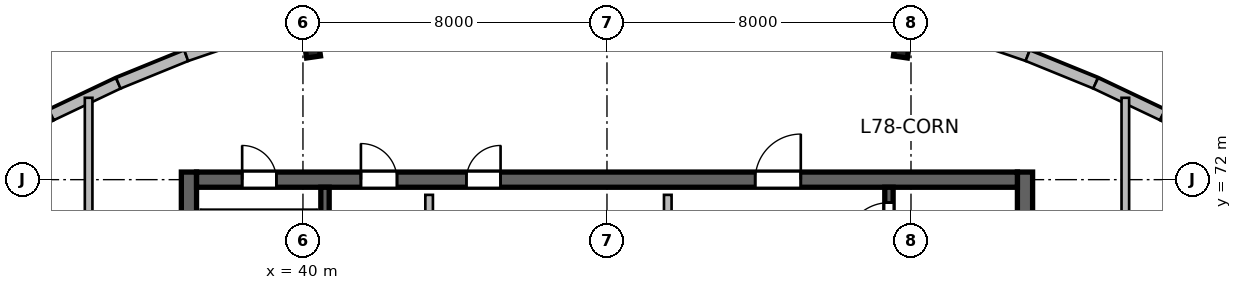
"""IFC4 building model, lengths in metres.
Left out: names, types, materials, properties, quantities, classifications, styles, units other than length and angle.
Written with IfcOpenShell. Run it as: python <this file> out.ifc"""

import sys

from ifc_helpers import new_model, si_unit, direction, frame, frame_2d, origin, origin_2d, place, context, subcontext, project, spatial, rectangle, i_section, extrude, source, transform, mapped, element, fill, save


model = new_model("IFC4")
c1 = context("Model", 3, precision=1e-05, world=origin(), true_north=direction((0.0, 1.0)))
c2 = subcontext(c1, "Body", "Model", "MODEL_VIEW")
j1 = project(units=[si_unit("LENGTHUNIT", "METRE"), si_unit("PLANEANGLEUNIT", "RADIAN")], contexts=[c1])
p1 = place(None, origin())
s1 = spatial("IfcSite", under=j1, at=p1, CompositionType="ELEMENT")
p2 = place(p1, origin())
s2 = spatial("IfcBuilding", under=s1, at=p2, CompositionType="ELEMENT")
p3 = place(p2, frame((0.0, 0.0, 323.4)))
s3 = spatial("IfcBuildingStorey", under=s2, at=p3, CompositionType="ELEMENT", Elevation=323.4)
m1 = source(origin(), c2, "Body", "SweptSolid", [
    extrude(rectangle(XDim=12.0, YDim=0.4, at=frame_2d((6.0, 0.0))), origin(), (0.0, 0.0, 1.0), 4.8),
])
for number, where, z_axis, x_axis in (
    (1, (37.0, 60.2, 0.0), (0.0, 0.0, 1.0), (0.0, 1.0, 0.0)),
    (2, (59.0, 60.2, 0.0), (0.0, 0.0, 1.0), (0.0, 1.0, 0.0)),
):
    element("IfcWall", number, at=place(p3, frame(where, z_axis=z_axis, x_axis=x_axis)), inside=s3, PredefinedType="SHEAR", context=c2, shape_type="MappedRepresentation", body=[
        mapped(m1, transform((0.0, 0.0, 0.0), scale=1.0)),
    ])
m2 = source(origin(), c2, "Body", "SweptSolid", [
    extrude(rectangle(XDim=21.6, YDim=0.4, at=frame_2d((10.8, 0.0))), origin(), (0.0, 0.0, 1.0), 4.8),
])
p4 = place(p3, frame((37.2, 72.0, 0.0), z_axis=(0.0, 0.0, 1.0), x_axis=(1.0, 0.0, 0.0)))
e3 = element("IfcWall", 3, at=p4, inside=s3, PredefinedType="SHEAR", context=c2, shape_type="MappedRepresentation", body=[
    mapped(m2, transform((0.0, 0.0, 0.0), scale=1.0)),
])
p5 = place(p4, frame((1.2, 0.0, 0.0)))
e4 = element("IfcOpeningElement", 4, at=p5, cuts=e3, PredefinedType="OPENING", context=c2, shape_type="SweptSolid", body=[
    extrude(rectangle(XDim=0.9, YDim=2.1, at=frame_2d((0.45, 1.05))), frame((0.0, 0.21, 0.0), z_axis=(0.0, -1.0, 0.0), x_axis=(1.0, 0.0, 0.0)), (0.0, 0.0, 1.0), 0.42),
])
p6 = place(p4, frame((14.7, 0.0, 0.0)))
e5 = element("IfcOpeningElement", 5, at=p6, cuts=e3, PredefinedType="OPENING", context=c2, shape_type="SweptSolid", body=[
    extrude(rectangle(XDim=1.2, YDim=2.15, at=frame_2d((0.6, 1.075))), frame((0.0, 0.21, 0.0), z_axis=(0.0, -1.0, 0.0), x_axis=(1.0, 0.0, 0.0)), (0.0, 0.0, 1.0), 0.42),
])
p7 = place(p4, frame((4.325, 0.0, 0.0)))
e6 = element("IfcOpeningElement", 6, at=p7, cuts=e3, PredefinedType="OPENING", context=c2, shape_type="SweptSolid", body=[
    extrude(rectangle(XDim=0.95, YDim=2.1, at=frame_2d((0.475, 1.05))), frame((0.0, 0.21, 0.0), z_axis=(0.0, -1.0, 0.0), x_axis=(1.0, 0.0, 0.0)), (0.0, 0.0, 1.0), 0.42),
])
p8 = place(p4, frame((7.1, 0.0, 0.0)))
e7 = element("IfcOpeningElement", 7, at=p8, cuts=e3, PredefinedType="OPENING", context=c2, shape_type="SweptSolid", body=[
    extrude(rectangle(XDim=0.9, YDim=2.1, at=frame_2d((0.45, 1.05))), frame((0.0, 0.21, 0.0), z_axis=(0.0, -1.0, 0.0), x_axis=(1.0, 0.0, 0.0)), (0.0, 0.0, 1.0), 0.42),
])
m3 = source(origin(), c2, "Body", "SweptSolid", [
    extrude(rectangle(XDim=11.2, YDim=0.22, at=frame_2d((5.6, 0.0))), origin(), (0.0, 0.0, 1.0), 4.8),
])
p9 = place(p3, frame((40.58, 60.6, 0.0), z_axis=(0.0, 0.0, 1.0), x_axis=(0.0, 1.0, 0.0)))
e8 = element("IfcWall", 8, at=p9, inside=s3, PredefinedType="SHEAR", context=c2, shape_type="MappedRepresentation", body=[
    mapped(m3, transform((0.0, 0.0, 0.0), scale=1.0)),
])
p10 = place(p3, frame((55.42, 60.6, 0.0), z_axis=(0.0, 0.0, 1.0), x_axis=(0.0, 1.0, 0.0)))
e9 = element("IfcWall", 9, at=p10, inside=s3, PredefinedType="SHEAR", context=c2, shape_type="MappedRepresentation", body=[
    mapped(m3, transform((0.0, 0.0, 0.0), scale=1.0)),
])
p11 = place(p10, frame((9.645, 0.0, 0.0)))
e10 = element("IfcOpeningElement", 10, at=p11, cuts=e9, PredefinedType="OPENING", context=c2, shape_type="SweptSolid", body=[
    extrude(rectangle(XDim=1.15, YDim=2.15, at=frame_2d((0.575, 1.075))), frame((0.0, 0.12, 0.0), z_axis=(0.0, -1.0, 0.0), x_axis=(1.0, 0.0, 0.0)), (0.0, 0.0, 1.0), 0.24),
])
m4 = source(origin(), c2, "Body", "SweptSolid", [
    extrude(i_section(OverallWidth=0.369, OverallDepth=0.356, WebThickness=0.011, FlangeThickness=0.018, at=origin_2d()), origin(), (0.0, 0.0, 1.0), 4.8),
])
for number, where, z_axis, x_axis in (
    (11, (40.253, 75.404, 0.0), (0.0, 0.0, 1.0), (-0.143, 0.99, 0.0)),
    (12, (55.747, 75.404, 0.0), (0.0, 0.0, 1.0), (0.143, 0.99, 0.0)),
):
    element("IfcColumn", number, at=place(p3, frame(where, z_axis=z_axis, x_axis=x_axis)), inside=s3, PredefinedType="COLUMN", context=c2, shape_type="MappedRepresentation", body=[
        mapped(m4, transform((0.0, 0.0, 0.0), scale=1.0)),
    ])
m5 = source(origin(), c2, "Body", "SweptSolid", [
    extrude(rectangle(XDim=1.972, YDim=0.3, at=frame_2d((0.986, 0.0))), origin(), (0.0, 0.0, 1.0), 4.59),
])
p12 = place(p3, frame((31.648, 72.758, 0.0), z_axis=(0.0, 0.0, 1.0), x_axis=(0.878387239208, 0.477949639603, 0.0)))
e13 = element("IfcWall", 13, at=p12, inside=s3, PredefinedType="SOLIDWALL", context=c2, shape_type="MappedRepresentation", body=[
    mapped(m5, transform((0.0, 0.0, 0.0), scale=1.0)),
])
m6 = source(origin(), c2, "Body", "SweptSolid", [
    extrude(rectangle(XDim=1.95, YDim=0.3, at=frame_2d((0.975, 0.0))), origin(), (0.0, 0.0, 1.0), 4.59),
])
p13 = place(p3, frame((33.38, 73.7, 0.0), z_axis=(0.0, 0.0, 1.0), x_axis=(0.903429098402, 0.428737523621, 0.0)))
e14 = element("IfcWall", 14, at=p13, inside=s3, PredefinedType="SOLIDWALL", context=c2, shape_type="MappedRepresentation", body=[
    mapped(m6, transform((0.0, 0.0, 0.0), scale=1.0)),
])
m7 = source(origin(), c2, "Body", "SweptSolid", [
    extrude(rectangle(XDim=1.93, YDim=0.3, at=frame_2d((0.965, 0.0))), origin(), (0.0, 0.0, 1.0), 4.59),
])
p14 = place(p3, frame((35.142, 74.536, 0.0), z_axis=(0.0, 0.0, 1.0), x_axis=(0.926200349129, 0.377031713882, 0.0)))
e15 = element("IfcWall", 15, at=p14, inside=s3, PredefinedType="SOLIDWALL", context=c2, shape_type="MappedRepresentation", body=[
    mapped(m7, transform((0.0, 0.0, 0.0), scale=1.0)),
])
m8 = source(origin(), c2, "Body", "SweptSolid", [
    extrude(rectangle(XDim=1.913, YDim=0.3, at=frame_2d((0.957, 0.0))), origin(), (0.0, 0.0, 1.0), 4.59),
])
for number, where, z_axis, x_axis in (
    (16, (36.93, 75.264, 0.0), (0.0, 0.0, 1.0), (0.946, 0.323, 0.0)),
    (17, (57.26, 75.882, 0.0), (0.0, 0.0, 1.0), (0.946, -0.323, 0.0)),
):
    element("IfcWall", number, at=place(p3, frame(where, z_axis=z_axis, x_axis=x_axis)), inside=s3, PredefinedType="SOLIDWALL", context=c2, shape_type="MappedRepresentation", body=[
        mapped(m8, transform((0.0, 0.0, 0.0), scale=1.0)),
    ])
p15 = place(p3, frame((59.07, 75.264, 0.0), z_axis=(0.0, 0.0, 1.0), x_axis=(0.926200349129, -0.377031713882, 0.0)))
e18 = element("IfcWall", 18, at=p15, inside=s3, PredefinedType="SOLIDWALL", context=c2, shape_type="MappedRepresentation", body=[
    mapped(m7, transform((0.0, 0.0, 0.0), scale=1.0)),
])
p16 = place(p3, frame((60.858, 74.536, 0.0), z_axis=(0.0, 0.0, 1.0), x_axis=(0.903429098402, -0.428737523621, 0.0)))
e19 = element("IfcWall", 19, at=p16, inside=s3, PredefinedType="SOLIDWALL", context=c2, shape_type="MappedRepresentation", body=[
    mapped(m6, transform((0.0, 0.0, 0.0), scale=1.0)),
])
p17 = place(p3, frame((62.62, 73.7, 0.0), z_axis=(0.0, 0.0, 1.0), x_axis=(0.878387239208, -0.477949639603, 0.0)))
e20 = element("IfcWall", 20, at=p17, inside=s3, PredefinedType="SOLIDWALL", context=c2, shape_type="MappedRepresentation", body=[
    mapped(m5, transform((0.0, 0.0, 0.0), scale=1.0)),
])
m9 = source(origin(), c2, "Body", "SweptSolid", [
    extrude(rectangle(XDim=5.8, YDim=0.2, at=frame_2d((2.9, 0.0))), origin(), (0.0, 0.0, 1.0), 4.59),
])
p18 = place(p3, frame((49.6, 65.8, 0.0), z_axis=(0.0, 0.0, 1.0), x_axis=(0.0, 1.0, 0.0)))
e21 = element("IfcWall", 21, at=p18, inside=s3, PredefinedType="SOLIDWALL", context=c2, shape_type="MappedRepresentation", body=[
    mapped(m9, transform((0.0, 0.0, 0.0), scale=1.0)),
])
m10 = source(origin(), c2, "Body", "SweptSolid", [
    extrude(rectangle(XDim=3.2, YDim=0.2, at=frame_2d((1.6, 0.0))), origin(), (0.0, 0.0, 1.0), 4.59),
])
p19 = place(p3, frame((43.32, 68.4, 0.0), z_axis=(0.0, 0.0, 1.0), x_axis=(0.0, 1.0, 0.0)))
e22 = element("IfcWall", 22, at=p19, inside=s3, PredefinedType="SOLIDWALL", context=c2, shape_type="MappedRepresentation", body=[
    mapped(m10, transform((0.0, 0.0, 0.0), scale=1.0)),
])
m11 = source(origin(), c2, "Body", "SweptSolid", [
    extrude(rectangle(XDim=22.582, YDim=0.2, at=frame_2d((11.291, 0.0))), origin(), (0.0, 0.0, 1.0), 4.59),
])
p20 = place(p3, frame((34.36, 51.572, 0.0), z_axis=(0.0, 0.0, 1.0), x_axis=(0.0, 1.0, 0.0)))
e23 = element("IfcWall", 23, at=p20, inside=s3, PredefinedType="SOLIDWALL", context=c2, shape_type="MappedRepresentation", body=[
    mapped(m11, transform((0.0, 0.0, 0.0), scale=1.0)),
])
p21 = place(p20, frame((10.691, 0.0, 0.0)))
e24 = element("IfcOpeningElement", 24, at=p21, cuts=e23, PredefinedType="OPENING", context=c2, shape_type="SweptSolid", body=[
    extrude(rectangle(XDim=1.2, YDim=2.15, at=frame_2d((0.6, 1.075))), frame((0.0, 0.11, 0.0), z_axis=(0.0, -1.0, 0.0), x_axis=(1.0, 0.0, 0.0)), (0.0, 0.0, 1.0), 0.22),
])
p22 = place(p3, frame((61.64, 51.572, 0.0), z_axis=(0.0, 0.0, 1.0), x_axis=(0.0, 1.0, 0.0)))
e25 = element("IfcWall", 25, at=p22, inside=s3, PredefinedType="SOLIDWALL", context=c2, shape_type="MappedRepresentation", body=[
    mapped(m11, transform((0.0, 0.0, 0.0), scale=1.0)),
])
p23 = place(p22, frame((10.691, 0.0, 0.0)))
e26 = element("IfcOpeningElement", 26, at=p23, cuts=e25, PredefinedType="OPENING", context=c2, shape_type="SweptSolid", body=[
    extrude(rectangle(XDim=1.2, YDim=2.15, at=frame_2d((0.6, 1.075))), frame((0.0, 0.11, 0.0), z_axis=(0.0, -1.0, 0.0), x_axis=(1.0, 0.0, 0.0)), (0.0, 0.0, 1.0), 0.22),
])
m12 = source(origin(), c2, "Body", "SweptSolid", [
    extrude(rectangle(XDim=0.9, YDim=2.1, at=frame_2d((0.45, 1.05))), frame((0.0, 0.025, 0.0), z_axis=(0.0, -1.0, 0.0), x_axis=(1.0, 0.0, 0.0)), (0.0, 0.0, 1.0), 0.05),
])
p24 = place(p5, origin())
e27 = element("IfcDoor", 27, at=p24, inside=s3, OperationType="SINGLE_SWING_LEFT", PredefinedType="DOOR", context=c2, shape_type="MappedRepresentation", body=[
    mapped(m12, transform((0.0, 0.0, 0.0), scale=1.0)),
])
fill(e4, e27)
m13 = source(origin(), c2, "Body", "SweptSolid", [
    extrude(rectangle(XDim=1.15, YDim=2.15, at=frame_2d((0.575, 1.075))), frame((0.0, 0.025, 0.0), z_axis=(0.0, -1.0, 0.0), x_axis=(1.0, 0.0, 0.0)), (0.0, 0.0, 1.0), 0.05),
])
p25 = place(p11, origin())
e28 = element("IfcDoor", 28, at=p25, inside=s3, OperationType="SINGLE_SWING_LEFT", PredefinedType="DOOR", context=c2, shape_type="MappedRepresentation", body=[
    mapped(m13, transform((0.0, 0.0, 0.0), scale=1.0)),
])
fill(e10, e28)
m14 = source(origin(), c2, "Body", "SweptSolid", [
    extrude(rectangle(XDim=1.2, YDim=2.15, at=frame_2d((0.6, 1.075))), frame((0.0, 0.025, 0.0), z_axis=(0.0, -1.0, 0.0), x_axis=(1.0, 0.0, 0.0)), (0.0, 0.0, 1.0), 0.05),
])
p26 = place(p6, origin())
e29 = element("IfcDoor", 29, at=p26, inside=s3, OperationType="SINGLE_SWING_RIGHT", PredefinedType="DOOR", context=c2, shape_type="MappedRepresentation", body=[
    mapped(m14, transform((0.0, 0.0, 0.0), scale=1.0)),
])
fill(e5, e29)
m15 = source(origin(), c2, "Body", "SweptSolid", [
    extrude(rectangle(XDim=0.95, YDim=2.1, at=frame_2d((0.475, 1.05))), frame((0.0, 0.025, 0.0), z_axis=(0.0, -1.0, 0.0), x_axis=(1.0, 0.0, 0.0)), (0.0, 0.0, 1.0), 0.05),
])
p27 = place(p7, origin())
e30 = element("IfcDoor", 30, at=p27, inside=s3, OperationType="SINGLE_SWING_LEFT", PredefinedType="DOOR", context=c2, shape_type="MappedRepresentation", body=[
    mapped(m15, transform((0.0, 0.0, 0.0), scale=1.0)),
])
fill(e6, e30)
p28 = place(p8, origin())
e31 = element("IfcDoor", 31, at=p28, inside=s3, OperationType="SINGLE_SWING_RIGHT", PredefinedType="DOOR", context=c2, shape_type="MappedRepresentation", body=[
    mapped(m12, transform((0.0, 0.0, 0.0), scale=1.0)),
])
fill(e7, e31)
save(model, sys.argv[1])
